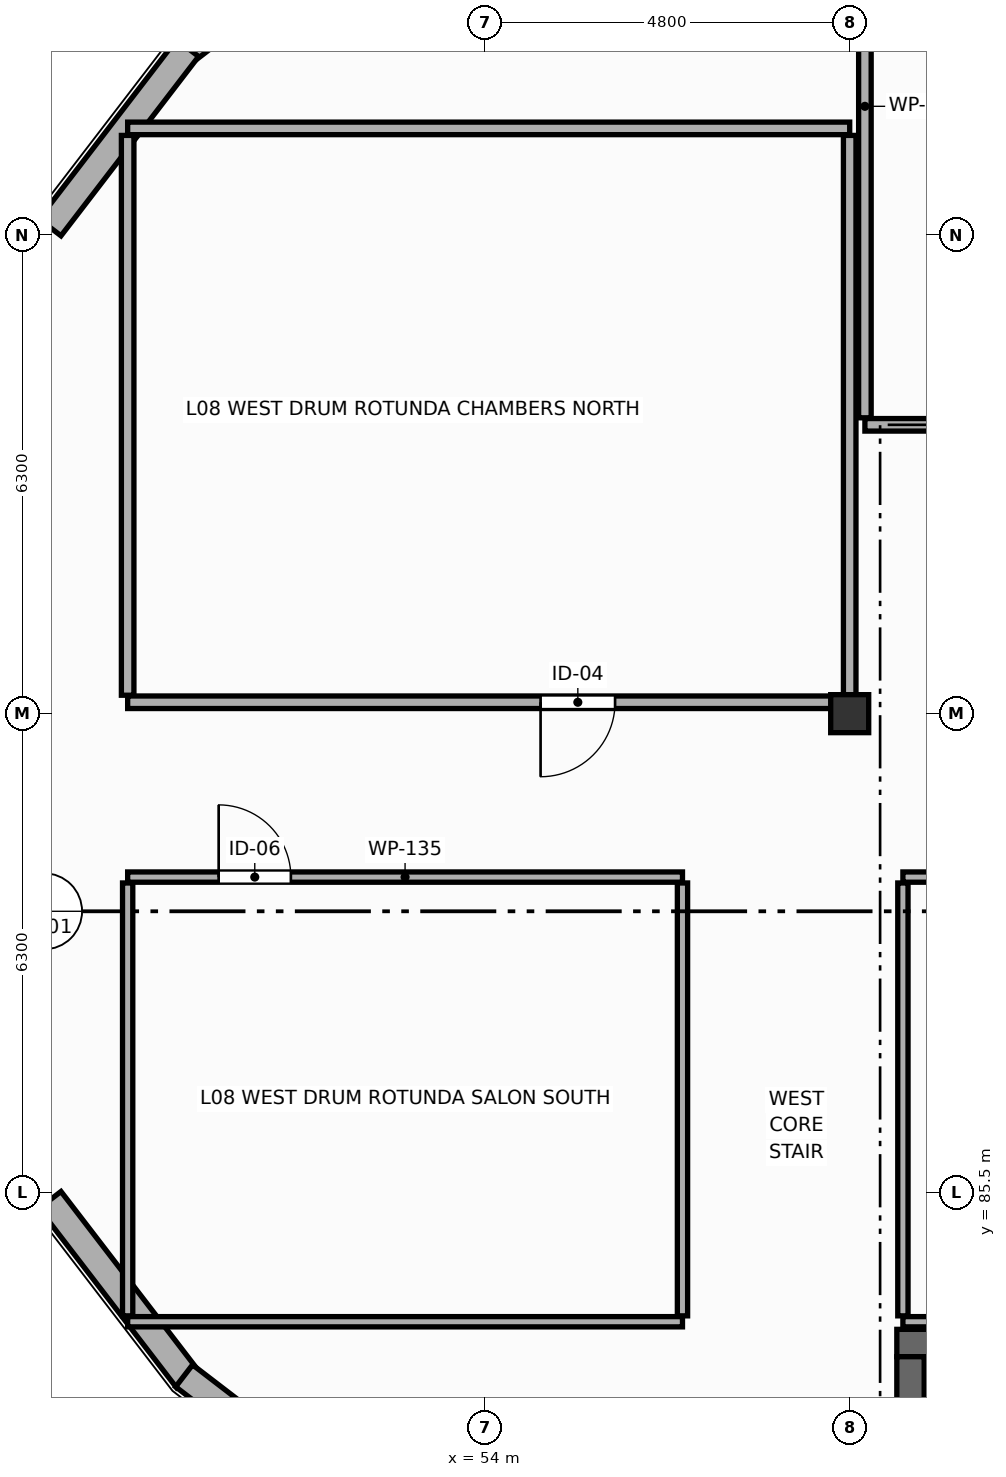
"""IFC4 building model, lengths in metres.
Left out: names, types, materials, properties, quantities, classifications, styles, units other than length and angle.
Written with IfcOpenShell. Run it as: python <this file> out.ifc"""

import sys

from ifc_helpers import new_model, si_unit, direction, frame, frame_2d, origin, origin_2d, place, context, subcontext, project, spatial, rectangle, extrude, element, fill, save


model = new_model("IFC4")
c1 = context("Model", 3, precision=1e-05, world=origin(), true_north=direction((0.0, 1.0)))
c2 = subcontext(c1, "Body", "Model", "MODEL_VIEW")
j1 = project(units=[si_unit("LENGTHUNIT", "METRE"), si_unit("PLANEANGLEUNIT", "RADIAN")], contexts=[c1])
p1 = place(None, origin())
s1 = spatial("IfcSite", under=j1, at=p1, CompositionType="ELEMENT")
p2 = place(p1, origin())
s2 = spatial("IfcBuilding", under=s1, at=p2, CompositionType="ELEMENT")
p3 = place(p2, frame((0.0, 0.0, 31.2)))
s3 = spatial("IfcBuildingStorey", under=s2, at=p3, CompositionType="ELEMENT", Elevation=31.2)
p4 = place(p3, frame((58.8, 91.8, 0.0), z_axis=(0.0, 0.0, 1.0), x_axis=(1.0, 0.0, 0.0)))
e1 = element("IfcColumn", 1, at=p4, inside=s3, PredefinedType="COLUMN", context=c2, shape_type="SweptSolid", body=[
    extrude(rectangle(XDim=0.5, YDim=0.5, at=origin_2d()), origin(), (0.0, 0.0, 1.0), 4.2),
])
p5 = place(p3, frame((52.402, 102.322, 0.0), z_axis=(0.0, 0.0, 1.0), x_axis=(-0.793361877219, -0.608750303306, 0.0)))
e2 = element("IfcWall", 2, at=p5, inside=s3, PredefinedType="ELEMENTEDWALL", context=c2, shape_type="SweptSolid", body=[
    extrude(rectangle(XDim=2.974, YDim=0.365, at=frame_2d((1.487, 0.0))), origin(), (0.0, 0.0, 1.0), 3.01),
])
p6 = place(p5, frame((1.087, 0.0, 0.85)))
e3 = element("IfcOpeningElement", 3, at=p6, cuts=e2, PredefinedType="OPENING", context=c2, shape_type="SweptSolid", body=[
    extrude(rectangle(XDim=0.8, YDim=1.7, at=frame_2d((0.4, 0.85))), frame((0.0, 0.192, 0.0), z_axis=(0.0, -1.0, 0.0), x_axis=(1.0, 0.0, 0.0)), (0.0, 0.0, 1.0), 0.385),
])
p7 = place(p3, frame((50.089, 100.557, 0.0), z_axis=(0.0, 0.0, 1.0), x_axis=(-0.608750303306, -0.793361877219, 0.0)))
e4 = element("IfcWall", 4, at=p7, inside=s3, PredefinedType="ELEMENTEDWALL", context=c2, shape_type="SweptSolid", body=[
    extrude(rectangle(XDim=2.974, YDim=0.365, at=frame_2d((1.487, 0.0))), origin(), (0.0, 0.0, 1.0), 3.11),
])
p8 = place(p3, frame((48.278, 85.402, 0.0), z_axis=(0.0, 0.0, 1.0), x_axis=(0.608710660898, -0.793392293452, 0.0)))
e5 = element("IfcWall", 5, at=p8, inside=s3, PredefinedType="ELEMENTEDWALL", context=c2, shape_type="SweptSolid", body=[
    extrude(rectangle(XDim=2.974, YDim=0.365, at=frame_2d((1.487, 0.0))), origin(), (0.0, 0.0, 1.0), 3.11),
])
p9 = place(p3, frame((50.043, 83.089, 0.0), z_axis=(0.0, 0.0, 1.0), x_axis=(0.793361877219, -0.608750303306, 0.0)))
e6 = element("IfcWall", 6, at=p9, inside=s3, PredefinedType="ELEMENTEDWALL", context=c2, shape_type="SweptSolid", body=[
    extrude(rectangle(XDim=2.974, YDim=0.365, at=frame_2d((1.487, 0.0))), origin(), (0.0, 0.0, 1.0), 3.01),
])
p10 = place(p9, frame((1.087, 0.0, 0.85)))
e7 = element("IfcOpeningElement", 7, at=p10, cuts=e6, PredefinedType="OPENING", context=c2, shape_type="SweptSolid", body=[
    extrude(rectangle(XDim=0.8, YDim=1.7, at=frame_2d((0.4, 0.85))), frame((0.0, 0.192, 0.0), z_axis=(0.0, -1.0, 0.0), x_axis=(1.0, 0.0, 0.0)), (0.0, 0.0, 1.0), 0.385),
])
p11 = place(p3, frame((59.42, 83.52, 0.0), z_axis=(0.0, 0.0, 1.0), x_axis=(1.0, 0.0, 0.0)))
e8 = element("IfcWall", 8, at=p11, inside=s3, PredefinedType="SHEAR", context=c2, shape_type="SweptSolid", body=[
    extrude(rectangle(XDim=9.36, YDim=0.36, at=frame_2d((4.68, 0.0))), origin(), (0.0, 0.0, 1.0), 3.98),
])
p12 = place(p3, frame((59.6, 79.98, 0.0), z_axis=(0.0, 0.0, 1.0), x_axis=(0.0, 1.0, 0.0)))
e9 = element("IfcWall", 9, at=p12, inside=s3, PredefinedType="SHEAR", context=c2, shape_type="SweptSolid", body=[
    extrude(rectangle(XDim=3.36, YDim=0.36, at=frame_2d((1.68, 0.0))), origin(), (0.0, 0.0, 1.0), 3.98),
])
p13 = place(p12, frame((1.08, 0.0, 0.0)))
e10 = element("IfcOpeningElement", 10, at=p13, cuts=e9, PredefinedType="OPENING", context=c2, shape_type="SweptSolid", body=[
    extrude(rectangle(XDim=1.2, YDim=2.2, at=frame_2d((0.6, 1.1))), frame((0.0, 0.19, 0.0), z_axis=(0.0, -1.0, 0.0), x_axis=(1.0, 0.0, 0.0)), (0.0, 0.0, 1.0), 0.38),
])
p14 = place(p3, frame((59.5, 89.65, 0.0), z_axis=(0.0, 0.0, 1.0), x_axis=(1.0, 0.0, 0.0)))
e11 = element("IfcWall", 11, at=p14, inside=s3, PredefinedType="PARTITIONING", context=c2, shape_type="SweptSolid", body=[
    extrude(rectangle(XDim=3.5, YDim=0.135, at=frame_2d((1.75, 0.0))), origin(), (0.0, 0.0, 1.0), 3.965),
])
p15 = place(p14, frame((1.275, 0.0, 0.0)))
e12 = element("IfcOpeningElement", 12, at=p15, cuts=e11, PredefinedType="OPENING", context=c2, shape_type="SweptSolid", body=[
    extrude(rectangle(XDim=0.95, YDim=2.15, at=frame_2d((0.475, 1.075))), frame((0.0, 0.077, 0.0), z_axis=(0.0, -1.0, 0.0), x_axis=(1.0, 0.0, 0.0)), (0.0, 0.0, 1.0), 0.155),
])
p16 = place(p3, frame((63.0, 83.8, 0.0), z_axis=(0.0, 0.0, 1.0), x_axis=(-1.0, 0.0, 0.0)))
e13 = element("IfcWall", 13, at=p16, inside=s3, PredefinedType="PARTITIONING", context=c2, shape_type="SweptSolid", body=[
    extrude(rectangle(XDim=3.5, YDim=0.135, at=frame_2d((1.75, 0.0))), origin(), (0.0, 0.0, 1.0), 3.965),
])
p17 = place(p3, frame((59.5, 83.877, 0.0), z_axis=(0.0, 0.0, 1.0), x_axis=(0.0, 1.0, 0.0)))
e14 = element("IfcWall", 14, at=p17, inside=s3, PredefinedType="PARTITIONING", context=c2, shape_type="SweptSolid", body=[
    extrude(rectangle(XDim=5.695, YDim=0.135, at=frame_2d((2.848, 0.0))), origin(), (0.0, 0.0, 1.0), 3.965),
])
p18 = place(p3, frame((72.4, 95.6, 0.0), z_axis=(0.0, 0.0, 1.0), x_axis=(-1.0, 0.0, 0.0)))
e15 = element("IfcWall", 15, at=p18, inside=s3, PredefinedType="PARTITIONING", context=c2, shape_type="SweptSolid", body=[
    extrude(rectangle(XDim=13.4, YDim=0.165, at=frame_2d((6.7, 0.0))), origin(), (0.0, 0.0, 1.0), 3.11),
])
p19 = place(p3, frame((59.0, 95.692, 0.0), z_axis=(0.0, 0.0, 1.0), x_axis=(0.0, 1.0, 0.0)))
e16 = element("IfcWall", 16, at=p19, inside=s3, PredefinedType="PARTITIONING", context=c2, shape_type="SweptSolid", body=[
    extrude(rectangle(XDim=8.304, YDim=0.165, at=frame_2d((4.152, 0.0))), origin(), (0.0, 0.0, 1.0), 3.11),
])
p20 = place(p3, frame((49.3, 99.5, 0.0), z_axis=(0.0, 0.0, 1.0), x_axis=(1.0, 0.0, 0.0)))
e17 = element("IfcWall", 17, at=p20, inside=s3, PredefinedType="PARTITIONING", context=c2, shape_type="SweptSolid", body=[
    extrude(rectangle(XDim=9.5, YDim=0.165, at=frame_2d((4.75, 0.0))), origin(), (0.0, 0.0, 1.0), 3.01),
])
p21 = place(p3, frame((58.8, 91.95, 0.0), z_axis=(0.0, 0.0, 1.0), x_axis=(-1.0, 0.0, 0.0)))
e18 = element("IfcWall", 18, at=p21, inside=s3, PredefinedType="PARTITIONING", context=c2, shape_type="SweptSolid", body=[
    extrude(rectangle(XDim=9.5, YDim=0.165, at=frame_2d((4.75, 0.0))), origin(), (0.0, 0.0, 1.0), 3.01),
])
p22 = place(p21, frame((3.087, 0.0, 0.0)))
e19 = element("IfcOpeningElement", 19, at=p22, cuts=e18, PredefinedType="OPENING", context=c2, shape_type="SweptSolid", body=[
    extrude(rectangle(XDim=0.98, YDim=2.2, at=frame_2d((0.49, 1.1))), frame((0.0, 0.093, 0.0), z_axis=(0.0, -1.0, 0.0), x_axis=(1.0, 0.0, 0.0)), (0.0, 0.0, 1.0), 0.185),
])
p23 = place(p3, frame((49.3, 92.042, 0.0), z_axis=(0.0, 0.0, 1.0), x_axis=(0.0, 1.0, 0.0)))
e20 = element("IfcWall", 20, at=p23, inside=s3, PredefinedType="PARTITIONING", context=c2, shape_type="SweptSolid", body=[
    extrude(rectangle(XDim=7.365, YDim=0.165, at=frame_2d((3.683, 0.0))), origin(), (0.0, 0.0, 1.0), 3.61),
])
p24 = place(p3, frame((58.8, 99.407, 0.0), z_axis=(0.0, 0.0, 1.0), x_axis=(0.0, -1.0, 0.0)))
e21 = element("IfcWall", 21, at=p24, inside=s3, PredefinedType="PARTITIONING", context=c2, shape_type="SweptSolid", body=[
    extrude(rectangle(XDim=7.365, YDim=0.165, at=frame_2d((3.683, 0.0))), origin(), (0.0, 0.0, 1.0), 3.11),
])
p25 = place(p3, frame((49.3, 89.65, 0.0), z_axis=(0.0, 0.0, 1.0), x_axis=(1.0, 0.0, 0.0)))
e22 = element("IfcWall", 22, at=p25, inside=s3, PredefinedType="PARTITIONING", context=c2, shape_type="SweptSolid", body=[
    extrude(rectangle(XDim=7.3, YDim=0.135, at=frame_2d((3.65, 0.0))), origin(), (0.0, 0.0, 1.0), 3.01),
])
p26 = place(p25, frame((1.198, 0.0, 0.0)))
e23 = element("IfcOpeningElement", 23, at=p26, cuts=e22, PredefinedType="OPENING", context=c2, shape_type="SweptSolid", body=[
    extrude(rectangle(XDim=0.95, YDim=2.15, at=frame_2d((0.475, 1.075))), frame((0.0, 0.077, 0.0), z_axis=(0.0, -1.0, 0.0), x_axis=(1.0, 0.0, 0.0)), (0.0, 0.0, 1.0), 0.155),
])
p27 = place(p3, frame((56.6, 83.8, 0.0), z_axis=(0.0, 0.0, 1.0), x_axis=(-1.0, 0.0, 0.0)))
e24 = element("IfcWall", 24, at=p27, inside=s3, PredefinedType="PARTITIONING", context=c2, shape_type="SweptSolid", body=[
    extrude(rectangle(XDim=7.3, YDim=0.135, at=frame_2d((3.65, 0.0))), origin(), (0.0, 0.0, 1.0), 3.01),
])
p28 = place(p3, frame((49.3, 83.877, 0.0), z_axis=(0.0, 0.0, 1.0), x_axis=(0.0, 1.0, 0.0)))
e25 = element("IfcWall", 25, at=p28, inside=s3, PredefinedType="PARTITIONING", context=c2, shape_type="SweptSolid", body=[
    extrude(rectangle(XDim=5.695, YDim=0.135, at=frame_2d((2.848, 0.0))), origin(), (0.0, 0.0, 1.0), 3.61),
])
p29 = place(p3, frame((56.6, 89.573, 0.0), z_axis=(0.0, 0.0, 1.0), x_axis=(0.0, -1.0, 0.0)))
e26 = element("IfcWall", 26, at=p29, inside=s3, PredefinedType="PARTITIONING", context=c2, shape_type="SweptSolid", body=[
    extrude(rectangle(XDim=5.695, YDim=0.135, at=frame_2d((2.848, 0.0))), origin(), (0.0, 0.0, 1.0), 3.965),
])
p30 = place(p22, origin())
e27 = element("IfcDoor", 27, at=p30, inside=s3, OperationType="SINGLE_SWING_RIGHT", PredefinedType="DOOR", context=c2, shape_type="SweptSolid", body=[
    extrude(rectangle(XDim=0.98, YDim=2.2, at=frame_2d((0.49, 1.1))), frame((0.0, 0.025, 0.0), z_axis=(0.0, -1.0, 0.0), x_axis=(1.0, 0.0, 0.0)), (0.0, 0.0, 1.0), 0.05),
])
fill(e19, e27)
p31 = place(p26, origin())
e28 = element("IfcDoor", 28, at=p31, inside=s3, OperationType="SINGLE_SWING_LEFT", PredefinedType="DOOR", context=c2, shape_type="SweptSolid", body=[
    extrude(rectangle(XDim=0.95, YDim=2.15, at=frame_2d((0.475, 1.075))), frame((0.0, 0.025, 0.0), z_axis=(0.0, -1.0, 0.0), x_axis=(1.0, 0.0, 0.0)), (0.0, 0.0, 1.0), 0.05),
])
fill(e23, e28)
save(model, sys.argv[1])
